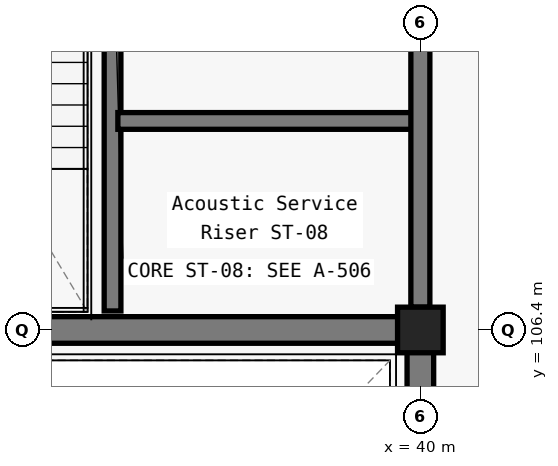
"""IFC4 building model, lengths in metres.
Left out: names, types, materials, properties, quantities, classifications, styles, units other than length and angle.
Written with IfcOpenShell. Run it as: python <this file> out.ifc"""

import sys

from ifc_helpers import new_model, si_unit, direction, frame, frame_2d, origin, origin_2d, place, context, subcontext, project, spatial, rectangle, extrude, element, save


model = new_model("IFC4")
c1 = context("Model", 3, precision=1e-05, world=origin(), true_north=direction((0.0, 1.0)))
c2 = subcontext(c1, "Body", "Model", "MODEL_VIEW")
j1 = project(units=[si_unit("LENGTHUNIT", "METRE"), si_unit("PLANEANGLEUNIT", "RADIAN")], contexts=[c1])
p1 = place(None, origin())
s1 = spatial("IfcSite", under=j1, at=p1, CompositionType="ELEMENT")
p2 = place(p1, origin())
s2 = spatial("IfcBuilding", under=s1, at=p2, CompositionType="ELEMENT")
p3 = place(p2, frame((0.0, 0.0, 5.4)))
s3 = spatial("IfcBuildingStorey", under=s2, at=p3, CompositionType="ELEMENT", Elevation=5.4)
p4 = place(p3, frame((40.0, 106.4, 0.0), z_axis=(0.0, 0.0, 1.0), x_axis=(1.0, 0.0, 0.0)))
e1 = element("IfcColumn", 1, at=p4, inside=s3, PredefinedType="COLUMN", context=c2, shape_type="SweptSolid", body=[
    extrude(rectangle(XDim=0.6, YDim=0.6, at=origin_2d()), origin(), (0.0, 0.0, 1.0), 4.8),
])
p5 = place(p3, frame((32.0, 106.4, 0.0), z_axis=(0.0, 0.0, 1.0), x_axis=(1.0, 0.0, 0.0)))
e2 = element("IfcWall", 2, at=p5, inside=s3, PredefinedType="SHEAR", context=c2, shape_type="SweptSolid", body=[
    extrude(rectangle(XDim=8.0, YDim=0.35, at=frame_2d((4.0, 0.0))), origin(), (0.0, 0.0, 1.0), 4.51),
])
p6 = place(p3, frame((40.0, 98.8, 0.0), z_axis=(0.0, 0.0, 1.0), x_axis=(0.0, 1.0, 0.0)))
e3 = element("IfcWall", 3, at=p6, inside=s3, PredefinedType="SHEAR", context=c2, shape_type="SweptSolid", body=[
    extrude(rectangle(XDim=7.6, YDim=0.35, at=frame_2d((3.8, 0.0))), origin(), (0.0, 0.0, 1.0), 4.51),
])
p7 = place(p3, frame((35.95, 106.65, 0.0), z_axis=(0.0, 0.0, 1.0), x_axis=(0.0, 1.0, 0.0)))
e4 = element("IfcWall", 4, at=p7, inside=s3, PredefinedType="SOLIDWALL", context=c2, shape_type="SweptSolid", body=[
    extrude(rectangle(XDim=7.1, YDim=0.22, at=frame_2d((3.55, 0.0))), origin(), (0.0, 0.0, 1.0), 4.51),
])
p8 = place(p7, frame((5.55, 0.0, 0.0)))
e5 = element("IfcOpeningElement", 5, at=p8, cuts=e4, PredefinedType="OPENING", context=c2, shape_type="SweptSolid", body=[
    extrude(rectangle(XDim=1.2, YDim=2.15, at=frame_2d((0.6, 1.075))), frame((0.0, 0.12, 0.0), z_axis=(0.0, -1.0, 0.0), x_axis=(1.0, 0.0, 0.0)), (0.0, 0.0, 1.0), 0.24),
])
p9 = place(p3, frame((36.02, 109.15, 0.0), z_axis=(0.0, 0.0, 1.0), x_axis=(1.0, 0.0, 0.0)))
e6 = element("IfcWall", 6, at=p9, inside=s3, PredefinedType="SOLIDWALL", context=c2, shape_type="SweptSolid", body=[
    extrude(rectangle(XDim=3.93, YDim=0.22, at=frame_2d((1.965, 0.0))), origin(), (0.0, 0.0, 1.0), 3.865),
])
p10 = place(p3, frame((40.0, 106.7, 0.0), z_axis=(0.0, 0.0, 1.0), x_axis=(0.0, 1.0, 0.0)))
e7 = element("IfcWall", 7, at=p10, inside=s3, PredefinedType="SOLIDWALL", context=c2, shape_type="SweptSolid", body=[
    extrude(rectangle(XDim=7.05, YDim=0.25, at=frame_2d((3.525, 0.0))), origin(), (0.0, 0.0, 1.0), 3.735),
])
p11 = place(p10, frame((3.55, 0.0, 0.0)))
e8 = element("IfcOpeningElement", 8, at=p11, cuts=e7, PredefinedType="OPENING", context=c2, shape_type="SweptSolid", body=[
    extrude(rectangle(XDim=1.35, YDim=2.2, at=frame_2d((0.675, 1.1))), frame((0.0, 0.135, 0.0), z_axis=(0.0, -1.0, 0.0), x_axis=(1.0, 0.0, 0.0)), (0.0, 0.0, 1.0), 0.27),
])
save(model, sys.argv[1])
